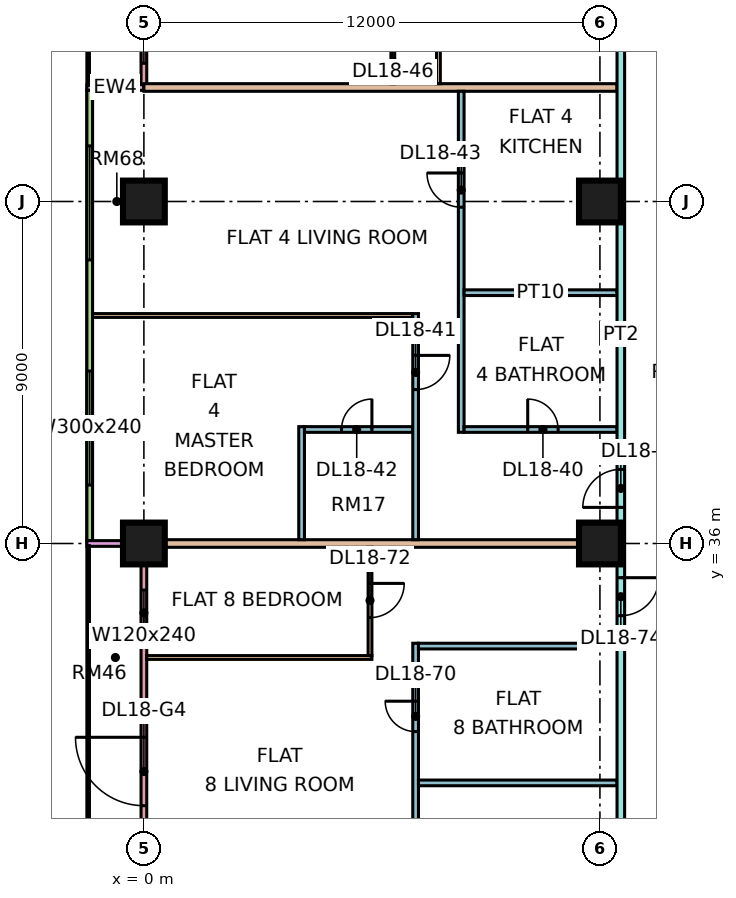
"""IFC4 building model, lengths in metres.
Left out: names, types, materials, properties, quantities, classifications, styles, units other than length and angle.
Written with IfcOpenShell. Run it as: python <this file> out.ifc"""

import sys

from ifc_helpers import new_model, si_unit, direction, frame, frame_2d, origin, origin_2d, place, context, subcontext, project, spatial, rectangle, extrude, element, fill, save


model = new_model("IFC4")
c1 = context("Model", 3, precision=1e-05, world=origin(), true_north=direction((0.0, 1.0)))
c2 = subcontext(c1, "Body", "Model", "MODEL_VIEW")
j1 = project(units=[si_unit("LENGTHUNIT", "METRE"), si_unit("PLANEANGLEUNIT", "RADIAN")], contexts=[c1])
p1 = place(None, origin())
s1 = spatial("IfcSite", under=j1, at=p1, CompositionType="ELEMENT")
p2 = place(p1, origin())
s2 = spatial("IfcBuilding", under=s1, at=p2, CompositionType="ELEMENT")
p3 = place(p2, frame((0.0, 0.0, 82.65)))
s3 = spatial("IfcBuildingStorey", under=s2, at=p3, CompositionType="ELEMENT", Elevation=82.65)
p4 = place(p3, frame((0.0, 36.0, 0.0), z_axis=(0.0, 0.0, 1.0), x_axis=(1.0, 0.0, 0.0)))
e1 = element("IfcColumn", 1, at=p4, inside=s3, PredefinedType="COLUMN", context=c2, shape_type="SweptSolid", body=[
    extrude(rectangle(XDim=1.1, YDim=1.1, at=origin_2d()), origin(), (0.0, 0.0, 1.0), 3.75),
])
for number, where, z_axis, x_axis in (
    (2, (0.0, 45.0, 0.0), (0.0, 0.0, 1.0), (1.0, 0.0, 0.0)),
    (3, (12.0, 36.0, 0.0), (0.0, 0.0, 1.0), (1.0, 0.0, 0.0)),
    (4, (12.0, 45.0, 0.0), (0.0, 0.0, 1.0), (1.0, 0.0, 0.0)),
):
    element("IfcColumn", number, at=place(p3, frame(where, z_axis=z_axis, x_axis=x_axis)), inside=s3, PredefinedType="COLUMN", context=c2, shape_type="SweptSolid", body=[
        extrude(rectangle(XDim=1.1, YDim=1.1, at=origin_2d()), origin(), (0.0, 0.0, 1.0), 3.75),
    ])
p5 = place(p3, frame((0.0, 61.425, 0.0), z_axis=(0.0, 0.0, 1.0), x_axis=(0.0, -1.0, 0.0)))
e5 = element("IfcWall", 5, at=p5, inside=s3, PredefinedType="SOLIDWALL", context=c2, shape_type="SweptSolid", body=[
    extrude(rectangle(XDim=13.35, YDim=0.15, at=frame_2d((6.675, 0.0))), origin(), (0.0, 0.0, 1.0), 3.3),
])
p6 = place(p5, frame((0.262, 0.0, 0.45)))
e6 = element("IfcOpeningElement", 6, at=p6, cuts=e5, PredefinedType="OPENING", context=c2, shape_type="SweptSolid", body=[
    extrude(rectangle(XDim=0.9, YDim=2.4, at=frame_2d((0.45, 1.2))), frame((0.0, 0.085, 0.0), z_axis=(0.0, -1.0, 0.0), x_axis=(1.0, 0.0, 0.0)), (0.0, 0.0, 1.0), 0.17),
])
p7 = place(p5, frame((3.2, 0.0, 0.0)))
e7 = element("IfcOpeningElement", 7, at=p7, cuts=e5, PredefinedType="OPENING", context=c2, shape_type="SweptSolid", body=[
    extrude(rectangle(XDim=1.8, YDim=2.4, at=frame_2d((0.9, 1.2))), frame((0.0, 0.085, 0.0), z_axis=(0.0, -1.0, 0.0), x_axis=(1.0, 0.0, 0.0)), (0.0, 0.0, 1.0), 0.17),
])
p8 = place(p5, frame((8.65, 0.0, 0.45)))
e8 = element("IfcOpeningElement", 8, at=p8, cuts=e5, PredefinedType="OPENING", context=c2, shape_type="SweptSolid", body=[
    extrude(rectangle(XDim=1.2, YDim=2.4, at=frame_2d((0.6, 1.2))), frame((0.0, 0.085, 0.0), z_axis=(0.0, -1.0, 0.0), x_axis=(1.0, 0.0, 0.0)), (0.0, 0.0, 1.0), 0.17),
])
p9 = place(p5, frame((10.988, 0.0, 0.45)))
e9 = element("IfcOpeningElement", 9, at=p9, cuts=e5, PredefinedType="OPENING", context=c2, shape_type="SweptSolid", body=[
    extrude(rectangle(XDim=1.8, YDim=2.4, at=frame_2d((0.9, 1.2))), frame((0.0, 0.085, 0.0), z_axis=(0.0, -1.0, 0.0), x_axis=(1.0, 0.0, 0.0)), (0.0, 0.0, 1.0), 0.17),
])
p10 = place(p3, frame((-1.5, 48.0, 0.0), z_axis=(0.0, 0.0, 1.0), x_axis=(1.0, 0.0, 0.0)))
e10 = element("IfcWall", 10, at=p10, inside=s3, PredefinedType="SOLIDWALL", context=c2, shape_type="SweptSolid", body=[
    extrude(rectangle(XDim=1.5, YDim=0.15, at=frame_2d((0.75, 0.0))), origin(), (0.0, 0.0, 1.0), 3.3),
])
p11 = place(p3, frame((-1.425, 47.925, 0.0), z_axis=(0.0, 0.0, 1.0), x_axis=(0.0, -1.0, 0.0)))
e11 = element("IfcWall", 11, at=p11, inside=s3, PredefinedType="SOLIDWALL", context=c2, shape_type="SweptSolid", body=[
    extrude(rectangle(XDim=11.85, YDim=0.15, at=frame_2d((5.925, 0.0))), origin(), (0.0, 0.0, 1.0), 3.3),
])
p12 = place(p11, frame((1.462, 0.0, 0.45)))
e12 = element("IfcOpeningElement", 12, at=p12, cuts=e11, PredefinedType="OPENING", context=c2, shape_type="SweptSolid", body=[
    extrude(rectangle(XDim=3.0, YDim=2.4, at=frame_2d((1.5, 1.2))), frame((0.0, 0.085, 0.0), z_axis=(0.0, -1.0, 0.0), x_axis=(1.0, 0.0, 0.0)), (0.0, 0.0, 1.0), 0.17),
])
p13 = place(p11, frame((7.387, 0.0, 0.45)))
e13 = element("IfcOpeningElement", 13, at=p13, cuts=e11, PredefinedType="OPENING", context=c2, shape_type="SweptSolid", body=[
    extrude(rectangle(XDim=3.0, YDim=2.4, at=frame_2d((1.5, 1.2))), frame((0.0, 0.085, 0.0), z_axis=(0.0, -1.0, 0.0), x_axis=(1.0, 0.0, 0.0)), (0.0, 0.0, 1.0), 0.17),
])
p14 = place(p3, frame((0.0, 35.925, 0.0), z_axis=(0.0, 0.0, 1.0), x_axis=(0.0, -1.0, 0.0)))
e14 = element("IfcWall", 14, at=p14, inside=s3, PredefinedType="SOLIDWALL", context=c2, shape_type="SweptSolid", body=[
    extrude(rectangle(XDim=11.85, YDim=0.15, at=frame_2d((5.925, 0.0))), origin(), (0.0, 0.0, 1.0), 3.3),
])
p15 = place(p14, frame((1.15, 0.0, 0.45)))
e15 = element("IfcOpeningElement", 15, at=p15, cuts=e14, PredefinedType="OPENING", context=c2, shape_type="SweptSolid", body=[
    extrude(rectangle(XDim=1.2, YDim=2.4, at=frame_2d((0.6, 1.2))), frame((0.0, 0.085, 0.0), z_axis=(0.0, -1.0, 0.0), x_axis=(1.0, 0.0, 0.0)), (0.0, 0.0, 1.0), 0.17),
])
p16 = place(p14, frame((5.025, 0.0, 0.0)))
e16 = element("IfcOpeningElement", 16, at=p16, cuts=e14, PredefinedType="OPENING", context=c2, shape_type="SweptSolid", body=[
    extrude(rectangle(XDim=1.8, YDim=2.4, at=frame_2d((0.9, 1.2))), frame((0.0, 0.085, 0.0), z_axis=(0.0, -1.0, 0.0), x_axis=(1.0, 0.0, 0.0)), (0.0, 0.0, 1.0), 0.17),
])
p17 = place(p14, frame((9.5, 0.0, 0.45)))
e17 = element("IfcOpeningElement", 17, at=p17, cuts=e14, PredefinedType="OPENING", context=c2, shape_type="SweptSolid", body=[
    extrude(rectangle(XDim=1.2, YDim=2.4, at=frame_2d((0.6, 1.2))), frame((0.0, 0.085, 0.0), z_axis=(0.0, -1.0, 0.0), x_axis=(1.0, 0.0, 0.0)), (0.0, 0.0, 1.0), 0.17),
])
p18 = place(p3, frame((-1.5, 36.0, 0.0), z_axis=(0.0, 0.0, 1.0), x_axis=(1.0, 0.0, 0.0)))
e18 = element("IfcWall", 18, at=p18, inside=s3, PredefinedType="SOLIDWALL", context=c2, shape_type="SweptSolid", body=[
    extrude(rectangle(XDim=1.5, YDim=0.15, at=frame_2d((0.75, 0.0))), origin(), (0.0, 0.0, 1.0), 3.3),
])
e19 = element("IfcWall", 19, at=p4, inside=s3, PredefinedType="PARTITIONING", context=c2, shape_type="SweptSolid", body=[
    extrude(rectangle(XDim=12.45, YDim=0.2, at=frame_2d((6.225, 0.0))), origin(), (0.0, 0.0, 1.0), 3.3),
])
p19 = place(p3, frame((-1.35, 42.0, 0.0), z_axis=(0.0, 0.0, 1.0), x_axis=(1.0, 0.0, 0.0)))
e20 = element("IfcWall", 20, at=p19, inside=s3, PredefinedType="PARTITIONING", context=c2, shape_type="SweptSolid", body=[
    extrude(rectangle(XDim=8.425, YDim=0.1, at=frame_2d((4.212, 0.0))), origin(), (0.0, 0.0, 1.0), 3.3),
])
p20 = place(p3, frame((0.0, 48.0, 0.0), z_axis=(0.0, 0.0, 1.0), x_axis=(1.0, 0.0, 0.0)))
e21 = element("IfcWall", 21, at=p20, inside=s3, PredefinedType="PARTITIONING", context=c2, shape_type="SweptSolid", body=[
    extrude(rectangle(XDim=12.45, YDim=0.2, at=frame_2d((6.225, 0.0))), origin(), (0.0, 0.0, 1.0), 3.3),
])
p21 = place(p3, frame((0.074, 33.0, 0.0), z_axis=(0.0, 0.0, 1.0), x_axis=(1.0, 0.0, 0.0)))
e22 = element("IfcWall", 22, at=p21, inside=s3, PredefinedType="PARTITIONING", context=c2, shape_type="SweptSolid", body=[
    extrude(rectangle(XDim=5.926, YDim=0.1, at=frame_2d((2.963, 0.0))), origin(), (0.0, 0.0, 1.0), 3.3),
])
p22 = place(p3, frame((4.15, 36.1, 0.0), z_axis=(0.0, 0.0, 1.0), x_axis=(0.0, 1.0, 0.0)))
e23 = element("IfcWall", 23, at=p22, inside=s3, PredefinedType="PARTITIONING", context=c2, shape_type="SweptSolid", body=[
    extrude(rectangle(XDim=2.975, YDim=0.15, at=frame_2d((1.487, 0.0))), origin(), (0.0, 0.0, 1.0), 3.3),
])
p23 = place(p3, frame((4.225, 39.0, 0.0), z_axis=(0.0, 0.0, 1.0), x_axis=(1.0, 0.0, 0.0)))
e24 = element("IfcWall", 24, at=p23, inside=s3, PredefinedType="PARTITIONING", context=c2, shape_type="SweptSolid", body=[
    extrude(rectangle(XDim=2.85, YDim=0.15, at=frame_2d((1.425, 0.0))), origin(), (0.0, 0.0, 1.0), 3.3),
])
p24 = place(p23, frame((0.975, 0.0, 0.0)))
e25 = element("IfcOpeningElement", 25, at=p24, cuts=e24, PredefinedType="OPENING", context=c2, shape_type="SweptSolid", body=[
    extrude(rectangle(XDim=0.8, YDim=2.1, at=frame_2d((0.4, 1.05))), frame((0.0, 0.085, 0.0), z_axis=(0.0, -1.0, 0.0), x_axis=(1.0, 0.0, 0.0)), (0.0, 0.0, 1.0), 0.17),
])
p25 = place(p3, frame((5.95, 33.05, 0.0), z_axis=(0.0, 0.0, 1.0), x_axis=(0.0, 1.0, 0.0)))
e26 = element("IfcWall", 26, at=p25, inside=s3, PredefinedType="PARTITIONING", context=c2, shape_type="SweptSolid", body=[
    extrude(rectangle(XDim=2.85, YDim=0.1, at=frame_2d((1.425, 0.0))), origin(), (0.0, 0.0, 1.0), 3.3),
])
p26 = place(p25, frame((1.0, 0.0, 0.0)))
e27 = element("IfcOpeningElement", 27, at=p26, cuts=e26, PredefinedType="OPENING", context=c2, shape_type="SweptSolid", body=[
    extrude(rectangle(XDim=0.9, YDim=2.1, at=frame_2d((0.45, 1.05))), frame((0.0, 0.06, 0.0), z_axis=(0.0, -1.0, 0.0), x_axis=(1.0, 0.0, 0.0)), (0.0, 0.0, 1.0), 0.12),
])
p27 = place(p3, frame((6.55, 48.1, 0.0), z_axis=(0.0, 0.0, 1.0), x_axis=(0.0, 1.0, 0.0)))
e28 = element("IfcWall", 28, at=p27, inside=s3, PredefinedType="PARTITIONING", context=c2, shape_type="SweptSolid", body=[
    extrude(rectangle(XDim=5.85, YDim=0.1, at=frame_2d((2.925, 0.0))), origin(), (0.0, 0.0, 1.0), 3.3),
])
p28 = place(p27, frame((0.95, 0.0, 0.0)))
e29 = element("IfcOpeningElement", 29, at=p28, cuts=e28, PredefinedType="OPENING", context=c2, shape_type="SweptSolid", body=[
    extrude(rectangle(XDim=0.9, YDim=2.1, at=frame_2d((0.45, 1.05))), frame((0.0, 0.06, 0.0), z_axis=(0.0, -1.0, 0.0), x_axis=(1.0, 0.0, 0.0)), (0.0, 0.0, 1.0), 0.12),
])
p29 = place(p27, frame((3.95, 0.0, 0.0)))
e30 = element("IfcOpeningElement", 30, at=p29, cuts=e28, PredefinedType="OPENING", context=c2, shape_type="SweptSolid", body=[
    extrude(rectangle(XDim=0.9, YDim=2.1, at=frame_2d((0.45, 1.05))), frame((0.0, 0.06, 0.0), z_axis=(0.0, -1.0, 0.0), x_axis=(1.0, 0.0, 0.0)), (0.0, 0.0, 1.0), 0.12),
])
p30 = place(p3, frame((7.15, 22.5, 0.0), z_axis=(0.0, 0.0, 1.0), x_axis=(0.0, 1.0, 0.0)))
e31 = element("IfcWall", 31, at=p30, inside=s3, PredefinedType="PARTITIONING", context=c2, shape_type="SweptSolid", body=[
    extrude(rectangle(XDim=10.875, YDim=0.15, at=frame_2d((5.438, 0.0))), origin(), (0.0, 0.0, 1.0), 3.3),
])
p31 = place(p30, frame((8.55, 0.0, 0.0)))
e32 = element("IfcOpeningElement", 32, at=p31, cuts=e31, PredefinedType="OPENING", context=c2, shape_type="SweptSolid", body=[
    extrude(rectangle(XDim=0.8, YDim=2.1, at=frame_2d((0.4, 1.05))), frame((0.0, 0.085, 0.0), z_axis=(0.0, -1.0, 0.0), x_axis=(1.0, 0.0, 0.0)), (0.0, 0.0, 1.0), 0.17),
])
p32 = place(p30, frame((3.05, 0.0, 0.0)))
e33 = element("IfcOpeningElement", 33, at=p32, cuts=e31, PredefinedType="OPENING", context=c2, shape_type="SweptSolid", body=[
    extrude(rectangle(XDim=0.9, YDim=2.1, at=frame_2d((0.45, 1.05))), frame((0.0, 0.085, 0.0), z_axis=(0.0, -1.0, 0.0), x_axis=(1.0, 0.0, 0.0)), (0.0, 0.0, 1.0), 0.17),
])
p33 = place(p3, frame((7.15, 36.1, 0.0), z_axis=(0.0, 0.0, 1.0), x_axis=(0.0, 1.0, 0.0)))
e34 = element("IfcWall", 34, at=p33, inside=s3, PredefinedType="PARTITIONING", context=c2, shape_type="SweptSolid", body=[
    extrude(rectangle(XDim=5.95, YDim=0.15, at=frame_2d((2.975, 0.0))), origin(), (0.0, 0.0, 1.0), 3.3),
])
p34 = place(p33, frame((3.95, 0.0, 0.0)))
e35 = element("IfcOpeningElement", 35, at=p34, cuts=e34, PredefinedType="OPENING", context=c2, shape_type="SweptSolid", body=[
    extrude(rectangle(XDim=0.9, YDim=2.1, at=frame_2d((0.45, 1.05))), frame((0.0, 0.085, 0.0), z_axis=(0.0, -1.0, 0.0), x_axis=(1.0, 0.0, 0.0)), (0.0, 0.0, 1.0), 0.17),
])
for number, where, z_axis, x_axis in (
    (36, (7.225, 29.7, 0.0), (0.0, 0.0, 1.0), (1.0, 0.0, 0.0)),
    (37, (7.225, 33.3, 0.0), (0.0, 0.0, 1.0), (1.0, 0.0, 0.0)),
):
    element("IfcWall", number, at=place(p3, frame(where, z_axis=z_axis, x_axis=x_axis)), inside=s3, PredefinedType="PARTITIONING", context=c2, shape_type="SweptSolid", body=[
        extrude(rectangle(XDim=5.225, YDim=0.15, at=frame_2d((2.612, 0.0))), origin(), (0.0, 0.0, 1.0), 3.3),
    ])
p35 = place(p3, frame((7.75, 48.1, 0.0), z_axis=(0.0, 0.0, 1.0), x_axis=(0.0, 1.0, 0.0)))
e38 = element("IfcWall", 38, at=p35, inside=s3, PredefinedType="PARTITIONING", context=c2, shape_type="SweptSolid", body=[
    extrude(rectangle(XDim=6.25, YDim=0.1, at=frame_2d((3.125, 0.0))), origin(), (0.0, 0.0, 1.0), 3.3),
])
p36 = place(p35, frame((2.6, 0.0, 0.0)))
e39 = element("IfcOpeningElement", 39, at=p36, cuts=e38, PredefinedType="OPENING", context=c2, shape_type="SweptSolid", body=[
    extrude(rectangle(XDim=0.9, YDim=2.1, at=frame_2d((0.45, 1.05))), frame((0.0, 0.06, 0.0), z_axis=(0.0, -1.0, 0.0), x_axis=(1.0, 0.0, 0.0)), (0.0, 0.0, 1.0), 0.12),
])
p37 = place(p3, frame((8.35, 38.925, 0.0), z_axis=(0.0, 0.0, 1.0), x_axis=(0.0, 1.0, 0.0)))
e40 = element("IfcWall", 40, at=p37, inside=s3, PredefinedType="PARTITIONING", context=c2, shape_type="SweptSolid", body=[
    extrude(rectangle(XDim=8.975, YDim=0.15, at=frame_2d((4.487, 0.0))), origin(), (0.0, 0.0, 1.0), 3.3),
])
p38 = place(p37, frame((5.925, 0.0, 0.0)))
e41 = element("IfcOpeningElement", 41, at=p38, cuts=e40, PredefinedType="OPENING", context=c2, shape_type="SweptSolid", body=[
    extrude(rectangle(XDim=0.9, YDim=2.1, at=frame_2d((0.45, 1.05))), frame((0.0, 0.085, 0.0), z_axis=(0.0, -1.0, 0.0), x_axis=(1.0, 0.0, 0.0)), (0.0, 0.0, 1.0), 0.17),
])
p39 = place(p3, frame((8.425, 39.0, 0.0), z_axis=(0.0, 0.0, 1.0), x_axis=(1.0, 0.0, 0.0)))
e42 = element("IfcWall", 42, at=p39, inside=s3, PredefinedType="PARTITIONING", context=c2, shape_type="SweptSolid", body=[
    extrude(rectangle(XDim=4.025, YDim=0.15, at=frame_2d((2.012, 0.0))), origin(), (0.0, 0.0, 1.0), 3.3),
])
p40 = place(p39, frame((1.675, 0.0, 0.0)))
e43 = element("IfcOpeningElement", 43, at=p40, cuts=e42, PredefinedType="OPENING", context=c2, shape_type="SweptSolid", body=[
    extrude(rectangle(XDim=0.8, YDim=2.1, at=frame_2d((0.4, 1.05))), frame((0.0, 0.085, 0.0), z_axis=(0.0, -1.0, 0.0), x_axis=(1.0, 0.0, 0.0)), (0.0, 0.0, 1.0), 0.17),
])
p41 = place(p3, frame((8.425, 42.6, 0.0), z_axis=(0.0, 0.0, 1.0), x_axis=(1.0, 0.0, 0.0)))
e44 = element("IfcWall", 44, at=p41, inside=s3, PredefinedType="PARTITIONING", context=c2, shape_type="SweptSolid", body=[
    extrude(rectangle(XDim=4.025, YDim=0.15, at=frame_2d((2.012, 0.0))), origin(), (0.0, 0.0, 1.0), 3.3),
])
p42 = place(p3, frame((12.55, 20.0, 0.0), z_axis=(0.0, 0.0, 1.0), x_axis=(0.0, 1.0, 0.0)))
e45 = element("IfcWall", 45, at=p42, inside=s3, PredefinedType="PARTITIONING", context=c2, shape_type="SweptSolid", body=[
    extrude(rectangle(XDim=43.0, YDim=0.2, at=frame_2d((21.5, 0.0))), origin(), (0.0, 0.0, 1.0), 3.3),
])
p43 = place(p42, frame((16.95, 0.0, 0.0)))
e46 = element("IfcOpeningElement", 46, at=p43, cuts=e45, PredefinedType="OPENING", context=c2, shape_type="SweptSolid", body=[
    extrude(rectangle(XDim=1.0, YDim=2.1, at=frame_2d((0.5, 1.05))), frame((0.0, 0.11, 0.0), z_axis=(0.0, -1.0, 0.0), x_axis=(1.0, 0.0, 0.0)), (0.0, 0.0, 1.0), 0.22),
])
p44 = place(p42, frame((35.25, 0.0, 0.0)))
e47 = element("IfcOpeningElement", 47, at=p44, cuts=e45, PredefinedType="OPENING", context=c2, shape_type="SweptSolid", body=[
    extrude(rectangle(XDim=1.0, YDim=2.1, at=frame_2d((0.5, 1.05))), frame((0.0, 0.11, 0.0), z_axis=(0.0, -1.0, 0.0), x_axis=(1.0, 0.0, 0.0)), (0.0, 0.0, 1.0), 0.22),
])
p45 = place(p42, frame((0.6, 0.0, 0.0)))
e48 = element("IfcOpeningElement", 48, at=p45, cuts=e45, PredefinedType="OPENING", context=c2, shape_type="SweptSolid", body=[
    extrude(rectangle(XDim=1.2, YDim=2.1, at=frame_2d((0.6, 1.05))), frame((0.0, 0.11, 0.0), z_axis=(0.0, -1.0, 0.0), x_axis=(1.0, 0.0, 0.0)), (0.0, 0.0, 1.0), 0.22),
])
p46 = place(p42, frame((14.1, 0.0, 0.0)))
e49 = element("IfcOpeningElement", 49, at=p46, cuts=e45, PredefinedType="OPENING", context=c2, shape_type="SweptSolid", body=[
    extrude(rectangle(XDim=1.0, YDim=2.1, at=frame_2d((0.5, 1.05))), frame((0.0, 0.11, 0.0), z_axis=(0.0, -1.0, 0.0), x_axis=(1.0, 0.0, 0.0)), (0.0, 0.0, 1.0), 0.22),
])
p47 = place(p9, origin())
e50 = element("IfcWindow", 50, at=p47, inside=s3, PartitioningType="SINGLE_PANEL", PredefinedType="WINDOW", context=c2, shape_type="SweptSolid", body=[
    extrude(rectangle(XDim=1.8, YDim=2.4, at=frame_2d((0.9, 1.2))), frame((0.0, 0.03, 0.0), z_axis=(0.0, -1.0, 0.0), x_axis=(1.0, 0.0, 0.0)), (0.0, 0.0, 1.0), 0.06),
])
fill(e9, e50)
p48 = place(p12, origin())
e51 = element("IfcWindow", 51, at=p48, inside=s3, PartitioningType="SINGLE_PANEL", PredefinedType="WINDOW", context=c2, shape_type="SweptSolid", body=[
    extrude(rectangle(XDim=3.0, YDim=2.4, at=frame_2d((1.5, 1.2))), frame((0.0, 0.03, 0.0), z_axis=(0.0, -1.0, 0.0), x_axis=(1.0, 0.0, 0.0)), (0.0, 0.0, 1.0), 0.06),
])
fill(e12, e51)
p49 = place(p13, origin())
e52 = element("IfcWindow", 52, at=p49, inside=s3, PartitioningType="SINGLE_PANEL", PredefinedType="WINDOW", context=c2, shape_type="SweptSolid", body=[
    extrude(rectangle(XDim=3.0, YDim=2.4, at=frame_2d((1.5, 1.2))), frame((0.0, 0.03, 0.0), z_axis=(0.0, -1.0, 0.0), x_axis=(1.0, 0.0, 0.0)), (0.0, 0.0, 1.0), 0.06),
])
fill(e13, e52)
p50 = place(p15, origin())
e53 = element("IfcWindow", 53, at=p50, inside=s3, PartitioningType="SINGLE_PANEL", PredefinedType="WINDOW", context=c2, shape_type="SweptSolid", body=[
    extrude(rectangle(XDim=1.2, YDim=2.4, at=frame_2d((0.6, 1.2))), frame((0.0, 0.03, 0.0), z_axis=(0.0, -1.0, 0.0), x_axis=(1.0, 0.0, 0.0)), (0.0, 0.0, 1.0), 0.06),
])
fill(e15, e53)
p51 = place(p16, frame((1.8, 0.0, 0.0), z_axis=(0.0, 0.0, 1.0), x_axis=(-1.0, 0.0, 0.0)))
e54 = element("IfcDoor", 54, at=p51, inside=s3, OperationType="DOUBLE_DOOR_SINGLE_SWING", PredefinedType="DOOR", context=c2, shape_type="SweptSolid", body=[
    extrude(rectangle(XDim=1.8, YDim=2.4, at=frame_2d((0.9, 1.2))), frame((0.0, 0.025, 0.0), z_axis=(0.0, -1.0, 0.0), x_axis=(1.0, 0.0, 0.0)), (0.0, 0.0, 1.0), 0.05),
])
fill(e16, e54)
p52 = place(p40, origin())
e55 = element("IfcDoor", 55, at=p52, inside=s3, OperationType="SINGLE_SWING_LEFT", PredefinedType="DOOR", context=c2, shape_type="SweptSolid", body=[
    extrude(rectangle(XDim=0.8, YDim=2.1, at=frame_2d((0.4, 1.05))), frame((0.0, 0.025, 0.0), z_axis=(0.0, -1.0, 0.0), x_axis=(1.0, 0.0, 0.0)), (0.0, 0.0, 1.0), 0.05),
])
fill(e43, e55)
p53 = place(p34, origin())
e56 = element("IfcDoor", 56, at=p53, inside=s3, OperationType="SINGLE_SWING_RIGHT", PredefinedType="DOOR", context=c2, shape_type="SweptSolid", body=[
    extrude(rectangle(XDim=0.9, YDim=2.1, at=frame_2d((0.45, 1.05))), frame((0.0, 0.025, 0.0), z_axis=(0.0, -1.0, 0.0), x_axis=(1.0, 0.0, 0.0)), (0.0, 0.0, 1.0), 0.05),
])
fill(e35, e56)
p54 = place(p24, frame((0.8, 0.0, 0.0), z_axis=(0.0, 0.0, 1.0), x_axis=(-1.0, 0.0, 0.0)))
e57 = element("IfcDoor", 57, at=p54, inside=s3, OperationType="SINGLE_SWING_RIGHT", PredefinedType="DOOR", context=c2, shape_type="SweptSolid", body=[
    extrude(rectangle(XDim=0.8, YDim=2.1, at=frame_2d((0.4, 1.05))), frame((0.0, 0.025, 0.0), z_axis=(0.0, -1.0, 0.0), x_axis=(1.0, 0.0, 0.0)), (0.0, 0.0, 1.0), 0.05),
])
fill(e25, e57)
p55 = place(p38, frame((0.9, 0.0, 0.0), z_axis=(0.0, 0.0, 1.0), x_axis=(-1.0, 0.0, 0.0)))
e58 = element("IfcDoor", 58, at=p55, inside=s3, OperationType="SINGLE_SWING_RIGHT", PredefinedType="DOOR", context=c2, shape_type="SweptSolid", body=[
    extrude(rectangle(XDim=0.9, YDim=2.1, at=frame_2d((0.45, 1.05))), frame((0.0, 0.025, 0.0), z_axis=(0.0, -1.0, 0.0), x_axis=(1.0, 0.0, 0.0)), (0.0, 0.0, 1.0), 0.05),
])
fill(e41, e58)
p56 = place(p43, origin())
e59 = element("IfcDoor", 59, at=p56, inside=s3, OperationType="SINGLE_SWING_LEFT", PredefinedType="DOOR", context=c2, shape_type="SweptSolid", body=[
    extrude(rectangle(XDim=1.0, YDim=2.1, at=frame_2d((0.5, 1.05))), frame((0.0, 0.025, 0.0), z_axis=(0.0, -1.0, 0.0), x_axis=(1.0, 0.0, 0.0)), (0.0, 0.0, 1.0), 0.05),
])
fill(e46, e59)
p57 = place(p31, frame((0.8, 0.0, 0.0), z_axis=(0.0, 0.0, 1.0), x_axis=(-1.0, 0.0, 0.0)))
e60 = element("IfcDoor", 60, at=p57, inside=s3, OperationType="SINGLE_SWING_RIGHT", PredefinedType="DOOR", context=c2, shape_type="SweptSolid", body=[
    extrude(rectangle(XDim=0.8, YDim=2.1, at=frame_2d((0.4, 1.05))), frame((0.0, 0.025, 0.0), z_axis=(0.0, -1.0, 0.0), x_axis=(1.0, 0.0, 0.0)), (0.0, 0.0, 1.0), 0.05),
])
fill(e32, e60)
p58 = place(p26, origin())
e61 = element("IfcDoor", 61, at=p58, inside=s3, OperationType="SINGLE_SWING_RIGHT", PredefinedType="DOOR", context=c2, shape_type="SweptSolid", body=[
    extrude(rectangle(XDim=0.9, YDim=2.1, at=frame_2d((0.45, 1.05))), frame((0.0, 0.025, 0.0), z_axis=(0.0, -1.0, 0.0), x_axis=(1.0, 0.0, 0.0)), (0.0, 0.0, 1.0), 0.05),
])
fill(e27, e61)
p59 = place(p46, origin())
e62 = element("IfcDoor", 62, at=p59, inside=s3, OperationType="SINGLE_SWING_RIGHT", PredefinedType="DOOR", context=c2, shape_type="SweptSolid", body=[
    extrude(rectangle(XDim=1.0, YDim=2.1, at=frame_2d((0.5, 1.05))), frame((0.0, 0.025, 0.0), z_axis=(0.0, -1.0, 0.0), x_axis=(1.0, 0.0, 0.0)), (0.0, 0.0, 1.0), 0.05),
])
fill(e49, e62)
save(model, sys.argv[1])
